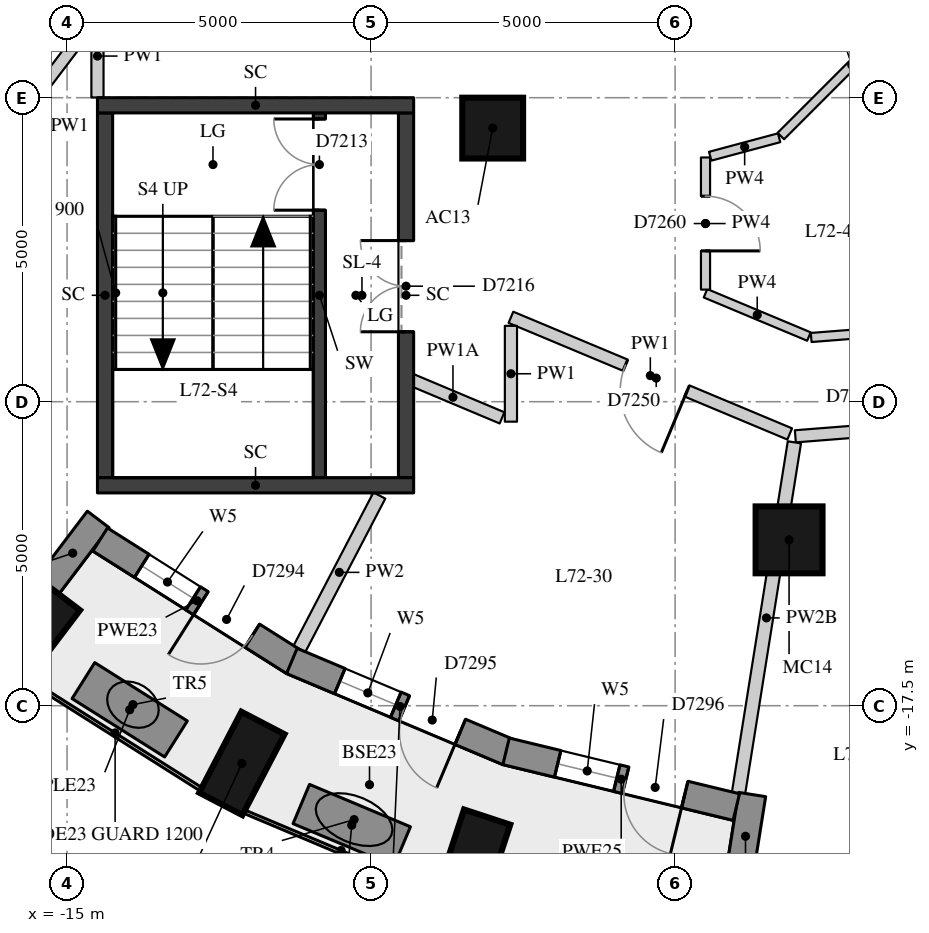
"""IFC4 building model, lengths in metres.
Left out: names, types, materials, properties, quantities, classifications, styles, units other than length and angle.
Written with IfcOpenShell. Run it as: python <this file> out.ifc"""

import sys

from ifc_helpers import new_model, si_unit, direction, frame, frame_2d, origin, origin_2d, place, context, subcontext, project, spatial, rectangle, extrude, element, fill, save


model = new_model("IFC4")
c1 = context("Model", 3, precision=1e-05, world=origin(), true_north=direction((0.0, 1.0)))
c2 = subcontext(c1, "Body", "Model", "MODEL_VIEW")
j1 = project(units=[si_unit("LENGTHUNIT", "METRE"), si_unit("PLANEANGLEUNIT", "RADIAN")], contexts=[c1])
p1 = place(None, origin())
s1 = spatial("IfcSite", under=j1, at=p1, CompositionType="ELEMENT")
p2 = place(p1, origin())
s2 = spatial("IfcBuilding", under=s1, at=p2, CompositionType="ELEMENT")
p3 = place(p2, frame((0.0, 0.0, 253.1)))
s3 = spatial("IfcBuildingStorey", under=s2, at=p3, CompositionType="ELEMENT", Elevation=253.1)
for number, where, z_axis, x_axis in (
    (1, (-15.559, -16.285, 0.0), (0.0, 0.0, 1.0), (-0.604, -0.797, 0.0)),
    (2, (-12.125, -18.449, 0.0), (0.0, 0.0, 1.0), (-0.462, -0.887, 0.0)),
    (3, (-8.326, -20.044, 0.0), (0.0, 0.0, 1.0), (-0.312, -0.95, 0.0)),
):
    element("IfcColumn", number, at=place(p3, frame(where, z_axis=z_axis, x_axis=x_axis)), inside=s3, PredefinedType="COLUMN", context=c2, shape_type="SweptSolid", body=[
        extrude(rectangle(XDim=1.5, YDim=0.8, at=origin_2d()), origin(), (0.0, 0.0, 1.0), 3.3),
    ])
p4 = place(p3, frame((-8.0, -8.0, 0.0), z_axis=(0.0, 0.0, 1.0), x_axis=(1.0, 0.0, 0.0)))
e4 = element("IfcColumn", 4, at=p4, inside=s3, PredefinedType="COLUMN", context=c2, shape_type="SweptSolid", body=[
    extrude(rectangle(XDim=1.0, YDim=1.0, at=origin_2d()), origin(), (0.0, 0.0, 1.0), 3.3),
])
p5 = place(p3, frame((-3.126, -14.772, 0.0), z_axis=(0.0, 0.0, 1.0), x_axis=(1.0, 0.0, 0.0)))
e5 = element("IfcColumn", 5, at=p5, inside=s3, PredefinedType="COLUMN", context=c2, shape_type="SweptSolid", body=[
    extrude(rectangle(XDim=1.1, YDim=1.1, at=origin_2d()), origin(), (0.0, 0.0, 1.0), 3.3),
])
p6 = place(p3, frame((-15.327, -15.545, 0.0), z_axis=(0.0, 0.0, 1.0), x_axis=(0.604148273711, 0.79687192407, 0.0)))
e6 = element("IfcWall", 6, at=p6, inside=s3, PredefinedType="SOLIDWALL", context=c2, shape_type="SweptSolid", body=[
    extrude(rectangle(XDim=1.391, YDim=0.45, at=frame_2d((0.695, 0.0))), origin(), (0.0, 0.0, 1.0), 2.57),
])
p7 = place(p3, frame((-3.951, -20.333, 0.0), z_axis=(0.0, 0.0, 1.0), x_axis=(0.157189016474, 0.9875685359, 0.0)))
e7 = element("IfcWall", 7, at=p7, inside=s3, PredefinedType="SOLIDWALL", context=c2, shape_type="SweptSolid", body=[
    extrude(rectangle(XDim=1.39, YDim=0.45, at=frame_2d((0.695, 0.0))), origin(), (0.0, 0.0, 1.0), 2.57),
])
p8 = place(p3, frame((-14.455, -14.767, 0.0), z_axis=(0.0, 0.0, 1.0), x_axis=(0.845183955488, -0.534475519912, 0.0)))
e8 = element("IfcWall", 8, at=p8, inside=s3, PredefinedType="SOLIDWALL", context=c2, shape_type="SweptSolid", body=[
    extrude(rectangle(XDim=3.769, YDim=0.45, at=frame_2d((1.884, 0.0))), origin(), (0.0, 0.0, 1.0), 3.02),
])
p9 = place(p8, frame((0.809, 0.0, 0.4)))
e9 = element("IfcOpeningElement", 9, at=p9, cuts=e8, PredefinedType="OPENING", context=c2, shape_type="SweptSolid", body=[
    extrude(rectangle(XDim=1.0, YDim=1.75, at=frame_2d((0.5, 0.875))), frame((0.0, 0.235, 0.0), z_axis=(0.0, -1.0, 0.0), x_axis=(1.0, 0.0, 0.0)), (0.0, 0.0, 1.0), 0.47),
])
p10 = place(p8, frame((1.959, 0.0, 0.0)))
e10 = element("IfcOpeningElement", 10, at=p10, cuts=e8, PredefinedType="OPENING", context=c2, shape_type="SweptSolid", body=[
    extrude(rectangle(XDim=1.0, YDim=2.15, at=frame_2d((0.5, 1.075))), frame((0.0, 0.235, 0.0), z_axis=(0.0, -1.0, 0.0), x_axis=(1.0, 0.0, 0.0)), (0.0, 0.0, 1.0), 0.47),
])
p11 = place(p3, frame((-11.303, -16.764, 0.0), z_axis=(0.0, 0.0, 1.0), x_axis=(0.921625850704, -0.388079619813, 0.0)))
e11 = element("IfcWall", 11, at=p11, inside=s3, PredefinedType="SOLIDWALL", context=c2, shape_type="SweptSolid", body=[
    extrude(rectangle(XDim=3.86, YDim=0.45, at=frame_2d((1.93, 0.0))), origin(), (0.0, 0.0, 1.0), 3.02),
])
p12 = place(p11, frame((0.855, 0.0, 0.4)))
e12 = element("IfcOpeningElement", 12, at=p12, cuts=e11, PredefinedType="OPENING", context=c2, shape_type="SweptSolid", body=[
    extrude(rectangle(XDim=1.0, YDim=1.75, at=frame_2d((0.5, 0.875))), frame((0.0, 0.235, 0.0), z_axis=(0.0, -1.0, 0.0), x_axis=(1.0, 0.0, 0.0)), (0.0, 0.0, 1.0), 0.47),
])
p13 = place(p11, frame((2.005, 0.0, 0.0)))
e13 = element("IfcOpeningElement", 13, at=p13, cuts=e11, PredefinedType="OPENING", context=c2, shape_type="SweptSolid", body=[
    extrude(rectangle(XDim=1.0, YDim=2.15, at=frame_2d((0.5, 1.075))), frame((0.0, 0.235, 0.0), z_axis=(0.0, -1.0, 0.0), x_axis=(1.0, 0.0, 0.0)), (0.0, 0.0, 1.0), 0.47),
])
p14 = place(p3, frame((-7.78, -18.25, 0.0), z_axis=(0.0, 0.0, 1.0), x_axis=(0.971943523304, -0.235214343755, 0.0)))
e14 = element("IfcWall", 14, at=p14, inside=s3, PredefinedType="SOLIDWALL", context=c2, shape_type="SweptSolid", body=[
    extrude(rectangle(XDim=3.896, YDim=0.45, at=frame_2d((1.948, 0.0))), origin(), (0.0, 0.0, 1.0), 3.02),
])
p15 = place(p14, frame((0.873, 0.0, 0.4)))
e15 = element("IfcOpeningElement", 15, at=p15, cuts=e14, PredefinedType="OPENING", context=c2, shape_type="SweptSolid", body=[
    extrude(rectangle(XDim=1.0, YDim=1.75, at=frame_2d((0.5, 0.875))), frame((0.0, 0.235, 0.0), z_axis=(0.0, -1.0, 0.0), x_axis=(1.0, 0.0, 0.0)), (0.0, 0.0, 1.0), 0.47),
])
p16 = place(p14, frame((2.023, 0.0, 0.0)))
e16 = element("IfcOpeningElement", 16, at=p16, cuts=e14, PredefinedType="OPENING", context=c2, shape_type="SweptSolid", body=[
    extrude(rectangle(XDim=1.0, YDim=2.15, at=frame_2d((0.5, 1.075))), frame((0.0, 0.235, 0.0), z_axis=(0.0, -1.0, 0.0), x_axis=(1.0, 0.0, 0.0)), (0.0, 0.0, 1.0), 0.47),
])
for number, where, z_axis, x_axis in (
    (17, (-14.731, -17.087, 0.0), (0.0, 0.0, 1.0), (0.846, -0.533, 0.0)),
    (18, (-11.148, -19.117, 0.0), (0.0, 0.0, 1.0), (0.922, -0.387, 0.0)),
):
    element("IfcWall", number, at=place(p3, frame(where, z_axis=z_axis, x_axis=x_axis)), inside=s3, PredefinedType="USERDEFINED", context=c2, shape_type="SweptSolid", body=[
        extrude(rectangle(XDim=1.8, YDim=0.7, at=frame_2d((0.9, 0.0))), origin(), (0.0, 0.0, 1.0), 0.75),
    ])
p17 = place(p3, frame((-10.85, -13.75, 0.0), z_axis=(0.0, 0.0, 1.0), x_axis=(0.0, 1.0, 0.0)))
e19 = element("IfcWall", 19, at=p17, inside=s3, PredefinedType="SHEAR", context=c2, shape_type="SweptSolid", body=[
    extrude(rectangle(XDim=6.0, YDim=0.2, at=frame_2d((3.0, 0.0))), origin(), (0.0, 0.0, 1.0), 3.02),
])
p18 = place(p17, frame((4.4, 0.0, 0.0)))
e20 = element("IfcOpeningElement", 20, at=p18, cuts=e19, PredefinedType="OPENING", context=c2, shape_type="SweptSolid", body=[
    extrude(rectangle(XDim=1.5, YDim=2.1, at=frame_2d((0.75, 1.05))), frame((0.0, 0.11, 0.0), z_axis=(0.0, -1.0, 0.0), x_axis=(1.0, 0.0, 0.0)), (0.0, 0.0, 1.0), 0.22),
])
p19 = place(p3, frame((-14.375, -13.75, -0.28), z_axis=(0.0, 0.0, 1.0), x_axis=(0.0, 1.0, 0.0)))
e21 = element("IfcWall", 21, at=p19, inside=s3, PredefinedType="SHEAR", context=c2, shape_type="SweptSolid", body=[
    extrude(rectangle(XDim=6.0, YDim=0.25, at=frame_2d((3.0, 0.0))), origin(), (0.0, 0.0, 1.0), 3.3),
])
p20 = place(p3, frame((-9.425, -13.75, -0.28), z_axis=(0.0, 0.0, 1.0), x_axis=(0.0, 1.0, 0.0)))
e22 = element("IfcWall", 22, at=p20, inside=s3, PredefinedType="SHEAR", context=c2, shape_type="SweptSolid", body=[
    extrude(rectangle(XDim=6.0, YDim=0.25, at=frame_2d((3.0, 0.0))), origin(), (0.0, 0.0, 1.0), 3.3),
])
p21 = place(p20, frame((2.4, 0.0, 0.28)))
e23 = element("IfcOpeningElement", 23, at=p21, cuts=e22, PredefinedType="OPENING", context=c2, shape_type="SweptSolid", body=[
    extrude(rectangle(XDim=1.5, YDim=2.1, at=frame_2d((0.75, 1.05))), frame((0.0, 0.135, 0.0), z_axis=(0.0, -1.0, 0.0), x_axis=(1.0, 0.0, 0.0)), (0.0, 0.0, 1.0), 0.27),
])
for number, where, z_axis, x_axis in (
    (24, (-14.5, -7.625, -0.28), (0.0, 0.0, 1.0), (1.0, 0.0, 0.0)),
    (25, (-14.5, -13.875, -0.28), (0.0, 0.0, 1.0), (1.0, 0.0, 0.0)),
):
    element("IfcWall", number, at=place(p3, frame(where, z_axis=z_axis, x_axis=x_axis)), inside=s3, PredefinedType="SHEAR", context=c2, shape_type="SweptSolid", body=[
        extrude(rectangle(XDim=5.2, YDim=0.25, at=frame_2d((2.6, 0.0))), origin(), (0.0, 0.0, 1.0), 3.3),
    ])
p22 = place(p3, frame((5.594, -12.392, 0.0), z_axis=(0.0, 0.0, 1.0), x_axis=(-0.996925151721, -0.078359695423, 0.0)))
e26 = element("IfcWall", 26, at=p22, inside=s3, PredefinedType="PARTITIONING", context=c2, shape_type="SweptSolid", body=[
    extrude(rectangle(XDim=8.643, YDim=0.2, at=frame_2d((4.321, 0.0))), origin(), (0.0, 0.0, 1.0), 3.02),
])
p23 = place(p22, frame((6.722, 0.0, 0.0)))
e27 = element("IfcOpeningElement", 27, at=p23, cuts=e26, PredefinedType="OPENING", context=c2, shape_type="SweptSolid", body=[
    extrude(rectangle(XDim=0.9, YDim=2.1, at=frame_2d((0.45, 1.05))), frame((0.0, 0.11, 0.0), z_axis=(0.0, -1.0, 0.0), x_axis=(1.0, 0.0, 0.0)), (0.0, 0.0, 1.0), 0.22),
])
p24 = place(p22, frame((2.309, 0.0, 0.0)))
e28 = element("IfcOpeningElement", 28, at=p24, cuts=e26, PredefinedType="OPENING", context=c2, shape_type="SweptSolid", body=[
    extrude(rectangle(XDim=1.1, YDim=2.1, at=frame_2d((0.55, 1.05))), frame((0.0, 0.11, 0.0), z_axis=(0.0, -1.0, 0.0), x_axis=(1.0, 0.0, 0.0)), (0.0, 0.0, 1.0), 0.22),
])
p25 = place(p3, frame((-3.115, -13.03, 0.0), z_axis=(0.0, 0.0, 1.0), x_axis=(-0.922510557065, 0.385971854031, 0.0)))
e29 = element("IfcWall", 29, at=p25, inside=s3, PredefinedType="PARTITIONING", context=c2, shape_type="SweptSolid", body=[
    extrude(rectangle(XDim=4.97, YDim=0.2, at=frame_2d((2.485, 0.0))), origin(), (0.0, 0.0, 1.0), 3.02),
])
p26 = place(p25, frame((1.829, 0.0, 0.0)))
e30 = element("IfcOpeningElement", 30, at=p26, cuts=e29, PredefinedType="OPENING", context=c2, shape_type="SweptSolid", body=[
    extrude(rectangle(XDim=1.1, YDim=2.1, at=frame_2d((0.55, 1.05))), frame((0.0, 0.11, 0.0), z_axis=(0.0, -1.0, 0.0), x_axis=(1.0, 0.0, 0.0)), (0.0, 0.0, 1.0), 0.22),
])
p27 = place(p3, frame((-7.7, -11.252, 0.0), z_axis=(0.0, 0.0, 1.0), x_axis=(0.0, -1.0, 0.0)))
e31 = element("IfcWall", 31, at=p27, inside=s3, PredefinedType="PARTITIONING", context=c2, shape_type="SweptSolid", body=[
    extrude(rectangle(XDim=1.576, YDim=0.2, at=frame_2d((0.788, 0.0))), origin(), (0.0, 0.0, 1.0), 3.02),
])
p28 = place(p3, frame((-7.846, -12.766, 0.0), z_axis=(0.0, 0.0, 1.0), x_axis=(-0.921813756196, 0.387633072489, 0.0)))
e32 = element("IfcWall", 32, at=p28, inside=s3, PredefinedType="PARTITIONING", context=c2, shape_type="SweptSolid", body=[
    extrude(rectangle(XDim=1.751, YDim=0.2, at=frame_2d((0.875, 0.0))), origin(), (0.0, 0.0, 1.0), 2.57),
])
p29 = place(p3, frame((-14.5, -7.496, 0.0), z_axis=(0.0, 0.0, 1.0), x_axis=(0.0, 1.0, 0.0)))
e33 = element("IfcWall", 33, at=p29, inside=s3, PredefinedType="PARTITIONING", context=c2, shape_type="SweptSolid", body=[
    extrude(rectangle(XDim=1.362, YDim=0.2, at=frame_2d((0.681, 0.0))), origin(), (0.0, 0.0, 1.0), 3.02),
])
p30 = place(p3, frame((-14.679, -6.372, 0.0), z_axis=(0.0, 0.0, 1.0), x_axis=(-0.604258962547, -0.796787993247, 0.0)))
e34 = element("IfcWall", 34, at=p30, inside=s3, PredefinedType="PARTITIONING", context=c2, shape_type="SweptSolid", body=[
    extrude(rectangle(XDim=2.682, YDim=0.2, at=frame_2d((1.341, 0.0))), origin(), (0.0, 0.0, 1.0), 3.02),
])
p31 = place(p3, frame((0.72, -11.17, 0.0), z_axis=(0.0, 0.0, 1.0), x_axis=(-0.996919759383, -0.078428268828, 0.0)))
e35 = element("IfcWall", 35, at=p31, inside=s3, PredefinedType="PARTITIONING", context=c2, shape_type="SweptSolid", body=[
    extrude(rectangle(XDim=3.493, YDim=0.15, at=frame_2d((1.746, 0.0))), origin(), (0.0, 0.0, 1.0), 3.02),
])
p32 = place(p3, frame((-2.799, -11.428, 0.0), z_axis=(0.0, 0.0, 1.0), x_axis=(-0.922507880735, 0.385978250659, 0.0)))
e36 = element("IfcWall", 36, at=p32, inside=s3, PredefinedType="PARTITIONING", context=c2, shape_type="SweptSolid", body=[
    extrude(rectangle(XDim=1.844, YDim=0.15, at=frame_2d((0.922, 0.0))), origin(), (0.0, 0.0, 1.0), 3.02),
])
p33 = place(p3, frame((-4.5, -10.656, 0.0), z_axis=(0.0, 0.0, 1.0), x_axis=(0.0, 1.0, 0.0)))
e37 = element("IfcWall", 37, at=p33, inside=s3, PredefinedType="PARTITIONING", context=c2, shape_type="SweptSolid", body=[
    extrude(rectangle(XDim=2.173, YDim=0.15, at=frame_2d((1.087, 0.0))), origin(), (0.0, 0.0, 1.0), 3.02),
])
p34 = place(p33, frame((0.637, 0.0, 0.0)))
e38 = element("IfcOpeningElement", 38, at=p34, cuts=e37, PredefinedType="OPENING", context=c2, shape_type="SweptSolid", body=[
    extrude(rectangle(XDim=0.9, YDim=2.1, at=frame_2d((0.45, 1.05))), frame((0.0, 0.085, 0.0), z_axis=(0.0, -1.0, 0.0), x_axis=(1.0, 0.0, 0.0)), (0.0, 0.0, 1.0), 0.17),
])
p35 = place(p3, frame((-4.423, -8.463, 0.0), z_axis=(0.0, 0.0, 1.0), x_axis=(0.965916469839, 0.258853961327, 0.0)))
e39 = element("IfcWall", 39, at=p35, inside=s3, PredefinedType="PARTITIONING", context=c2, shape_type="SweptSolid", body=[
    extrude(rectangle(XDim=1.173, YDim=0.15, at=frame_2d((0.587, 0.0))), origin(), (0.0, 0.0, 1.0), 3.02),
])
p36 = place(p3, frame((-3.261, -8.131, 0.0), z_axis=(0.0, 0.0, 1.0), x_axis=(0.707106781187, 0.707106781187, 0.0)))
e40 = element("IfcWall", 40, at=p36, inside=s3, PredefinedType="PARTITIONING", context=c2, shape_type="SweptSolid", body=[
    extrude(rectangle(XDim=3.3, YDim=0.15, at=frame_2d((1.65, 0.0))), origin(), (0.0, 0.0, 1.0), 3.02),
])
p37 = place(p3, frame((-11.181, -16.571, 0.0), z_axis=(0.0, 0.0, 1.0), x_axis=(0.462325972726, 0.886710039947, 0.0)))
e41 = element("IfcWall", 41, at=p37, inside=s3, PredefinedType="PARTITIONING", context=c2, shape_type="SweptSolid", body=[
    extrude(rectangle(XDim=2.851, YDim=0.22, at=frame_2d((1.425, 0.0))), origin(), (0.0, 0.0, 1.0), 3.02),
])
p38 = place(p3, frame((-3.958, -18.944, 0.0), z_axis=(0.0, 0.0, 1.0), x_axis=(0.157252920937, 0.987558362253, 0.0)))
e42 = element("IfcWall", 42, at=p38, inside=s3, PredefinedType="PARTITIONING", context=c2, shape_type="SweptSolid", body=[
    extrude(rectangle(XDim=5.848, YDim=0.22, at=frame_2d((2.924, 0.0))), origin(), (0.0, 0.0, 1.0), 2.57),
])
p39 = place(p9, origin())
e43 = element("IfcWindow", 43, at=p39, inside=s3, PartitioningType="SINGLE_PANEL", PredefinedType="WINDOW", context=c2, shape_type="SweptSolid", body=[
    extrude(rectangle(XDim=1.0, YDim=1.75, at=frame_2d((0.5, 0.875))), frame((0.0, 0.035, 0.0), z_axis=(0.0, -1.0, 0.0), x_axis=(1.0, 0.0, 0.0)), (0.0, 0.0, 1.0), 0.06),
])
fill(e9, e43)
p40 = place(p10, frame((1.0, 0.0, 0.0), z_axis=(0.0, 0.0, 1.0), x_axis=(-1.0, 0.0, 0.0)))
e44 = element("IfcDoor", 44, at=p40, inside=s3, OperationType="SINGLE_SWING_RIGHT", PredefinedType="DOOR", context=c2, shape_type="SweptSolid", body=[
    extrude(rectangle(XDim=1.0, YDim=2.15, at=frame_2d((0.5, 1.075))), frame((0.0, 0.075, 0.0), z_axis=(0.0, -1.0, 0.0), x_axis=(1.0, 0.0, 0.0)), (0.0, 0.0, 1.0), 0.05),
])
fill(e10, e44)
p41 = place(p12, origin())
e45 = element("IfcWindow", 45, at=p41, inside=s3, PartitioningType="SINGLE_PANEL", PredefinedType="WINDOW", context=c2, shape_type="SweptSolid", body=[
    extrude(rectangle(XDim=1.0, YDim=1.75, at=frame_2d((0.5, 0.875))), frame((0.0, 0.035, 0.0), z_axis=(0.0, -1.0, 0.0), x_axis=(1.0, 0.0, 0.0)), (0.0, 0.0, 1.0), 0.06),
])
fill(e12, e45)
p42 = place(p13, frame((1.0, 0.0, 0.0), z_axis=(0.0, 0.0, 1.0), x_axis=(-1.0, 0.0, 0.0)))
e46 = element("IfcDoor", 46, at=p42, inside=s3, OperationType="SINGLE_SWING_LEFT", PredefinedType="DOOR", context=c2, shape_type="SweptSolid", body=[
    extrude(rectangle(XDim=1.0, YDim=2.15, at=frame_2d((0.5, 1.075))), frame((0.0, 0.075, 0.0), z_axis=(0.0, -1.0, 0.0), x_axis=(1.0, 0.0, 0.0)), (0.0, 0.0, 1.0), 0.05),
])
fill(e13, e46)
p43 = place(p15, origin())
e47 = element("IfcWindow", 47, at=p43, inside=s3, PartitioningType="SINGLE_PANEL", PredefinedType="WINDOW", context=c2, shape_type="SweptSolid", body=[
    extrude(rectangle(XDim=1.0, YDim=1.75, at=frame_2d((0.5, 0.875))), frame((0.0, 0.035, 0.0), z_axis=(0.0, -1.0, 0.0), x_axis=(1.0, 0.0, 0.0)), (0.0, 0.0, 1.0), 0.06),
])
fill(e15, e47)
p44 = place(p16, frame((1.0, 0.0, 0.0), z_axis=(0.0, 0.0, 1.0), x_axis=(-1.0, 0.0, 0.0)))
e48 = element("IfcDoor", 48, at=p44, inside=s3, OperationType="SINGLE_SWING_LEFT", PredefinedType="DOOR", context=c2, shape_type="SweptSolid", body=[
    extrude(rectangle(XDim=1.0, YDim=2.15, at=frame_2d((0.5, 1.075))), frame((0.0, 0.075, 0.0), z_axis=(0.0, -1.0, 0.0), x_axis=(1.0, 0.0, 0.0)), (0.0, 0.0, 1.0), 0.05),
])
fill(e16, e48)
p45 = place(p18, origin())
e49 = element("IfcDoor", 49, at=p45, inside=s3, OperationType="DOUBLE_DOOR_SINGLE_SWING", PredefinedType="DOOR", context=c2, shape_type="SweptSolid", body=[
    extrude(rectangle(XDim=1.5, YDim=2.1, at=frame_2d((0.75, 1.05))), frame((0.0, 0.025, 0.0), z_axis=(0.0, -1.0, 0.0), x_axis=(1.0, 0.0, 0.0)), (0.0, 0.0, 1.0), 0.05),
])
fill(e20, e49)
p46 = place(p21, origin())
e50 = element("IfcDoor", 50, at=p46, inside=s3, OperationType="DOUBLE_DOOR_SINGLE_SWING", PredefinedType="DOOR", context=c2, shape_type="SweptSolid", body=[
    extrude(rectangle(XDim=1.5, YDim=2.1, at=frame_2d((0.75, 1.05))), frame((0.0, 0.025, 0.0), z_axis=(0.0, -1.0, 0.0), x_axis=(1.0, 0.0, 0.0)), (0.0, 0.0, 1.0), 0.05),
])
fill(e23, e50)
p47 = place(p26, origin())
e51 = element("IfcDoor", 51, at=p47, inside=s3, OperationType="SINGLE_SWING_LEFT", PredefinedType="DOOR", context=c2, shape_type="SweptSolid", body=[
    extrude(rectangle(XDim=1.1, YDim=2.1, at=frame_2d((0.55, 1.05))), frame((0.0, 0.025, 0.0), z_axis=(0.0, -1.0, 0.0), x_axis=(1.0, 0.0, 0.0)), (0.0, 0.0, 1.0), 0.05),
])
fill(e30, e51)
p48 = place(p34, origin())
e52 = element("IfcDoor", 52, at=p48, inside=s3, OperationType="SINGLE_SWING_RIGHT", PredefinedType="DOOR", context=c2, shape_type="SweptSolid", body=[
    extrude(rectangle(XDim=0.9, YDim=2.1, at=frame_2d((0.45, 1.05))), frame((0.0, 0.025, 0.0), z_axis=(0.0, -1.0, 0.0), x_axis=(1.0, 0.0, 0.0)), (0.0, 0.0, 1.0), 0.05),
])
fill(e38, e52)
save(model, sys.argv[1])
